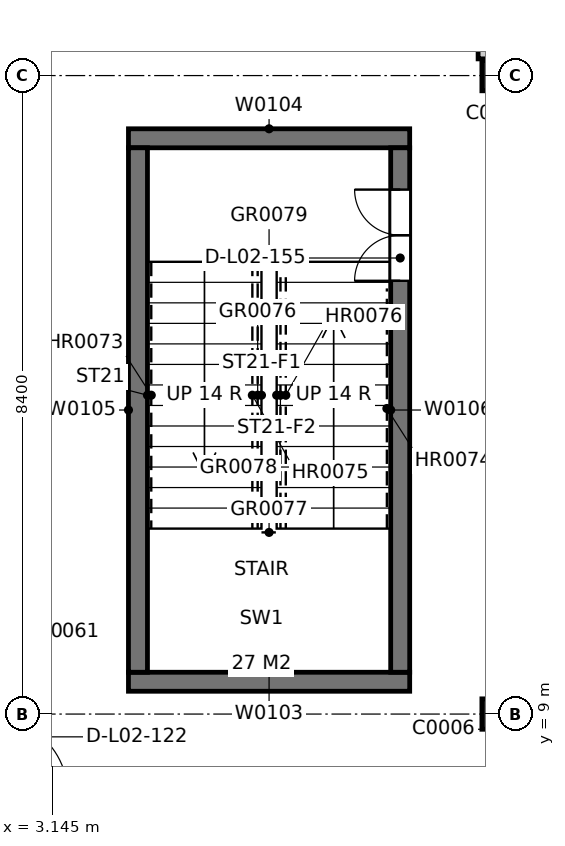
"""IFC4 building model, lengths in metres.
Left out: names, types, materials, properties, quantities, classifications, styles, units other than length and angle.
Written with IfcOpenShell. Run it as: python <this file> out.ifc"""

import sys

from ifc_helpers import new_model, si_unit, direction, frame, frame_2d, origin, origin_2d, place, context, subcontext, project, spatial, rectangle, extrude, element, fill, save


model = new_model("IFC4")
c1 = context("Model", 3, precision=1e-05, world=origin(), true_north=direction((0.0, 1.0)))
c2 = subcontext(c1, "Body", "Model", "MODEL_VIEW")
j1 = project(units=[si_unit("LENGTHUNIT", "METRE"), si_unit("PLANEANGLEUNIT", "RADIAN")], contexts=[c1])
p1 = place(None, origin())
s1 = spatial("IfcSite", under=j1, at=p1, CompositionType="ELEMENT")
p2 = place(p1, origin())
s2 = spatial("IfcBuilding", under=s1, at=p2, CompositionType="ELEMENT")
p3 = place(p2, frame((0.0, 0.0, 9.6)))
s3 = spatial("IfcBuildingStorey", under=s2, at=p3, CompositionType="ELEMENT", Elevation=9.6)
for number, where, z_axis, x_axis in (
    (1, (9.0, 9.0, 0.0), (0.0, 0.0, 1.0), (1.0, 0.0, 0.0)),
    (2, (9.0, 17.4, 0.0), (0.0, 0.0, 1.0), (1.0, 0.0, 0.0)),
):
    element("IfcColumn", number, at=place(p3, frame(where, z_axis=z_axis, x_axis=x_axis)), inside=s3, PredefinedType="COLUMN", context=c2, shape_type="SweptSolid", body=[
        extrude(rectangle(XDim=0.4, YDim=0.4, at=origin_2d()), origin(), (0.0, 0.0, 1.0), 4.8),
    ])
for number, where, z_axis, x_axis in (
    (3, (4.15, 9.425, 0.0), (0.0, 0.0, 1.0), (1.0, 0.0, 0.0)),
    (4, (4.15, 16.575, 0.0), (0.0, 0.0, 1.0), (1.0, 0.0, 0.0)),
):
    element("IfcWall", number, at=place(p3, frame(where, z_axis=z_axis, x_axis=x_axis)), inside=s3, PredefinedType="SOLIDWALL", context=c2, shape_type="SweptSolid", body=[
        extrude(rectangle(XDim=3.7, YDim=0.25, at=frame_2d((1.85, 0.0))), origin(), (0.0, 0.0, 1.0), 4.8),
    ])
p4 = place(p3, frame((4.275, 9.55, 0.0), z_axis=(0.0, 0.0, 1.0), x_axis=(0.0, 1.0, 0.0)))
e5 = element("IfcWall", 5, at=p4, inside=s3, PredefinedType="SOLIDWALL", context=c2, shape_type="SweptSolid", body=[
    extrude(rectangle(XDim=6.9, YDim=0.25, at=frame_2d((3.45, 0.0))), origin(), (0.0, 0.0, 1.0), 4.8),
])
p5 = place(p3, frame((7.725, 9.55, 0.0), z_axis=(0.0, 0.0, 1.0), x_axis=(0.0, 1.0, 0.0)))
e6 = element("IfcWall", 6, at=p5, inside=s3, PredefinedType="SOLIDWALL", context=c2, shape_type="SweptSolid", body=[
    extrude(rectangle(XDim=6.9, YDim=0.25, at=frame_2d((3.45, 0.0))), origin(), (0.0, 0.0, 1.0), 4.8),
])
p6 = place(p5, frame((5.15, 0.0, 0.0)))
e7 = element("IfcOpeningElement", 7, at=p6, cuts=e6, PredefinedType="OPENING", context=c2, shape_type="SweptSolid", body=[
    extrude(rectangle(XDim=1.2, YDim=2.1, at=frame_2d((0.6, 1.05))), frame((0.0, 0.135, 0.0), z_axis=(0.0, -1.0, 0.0), x_axis=(1.0, 0.0, 0.0)), (0.0, 0.0, 1.0), 0.27),
])
p7 = place(p3, frame((8.81, 18.562, 0.0), z_axis=(0.0, 0.0, 1.0), x_axis=(0.003370476059, -0.999994319929, 0.0)))
e8 = element("IfcWall", 8, at=p7, inside=s3, PredefinedType="PARTITIONING", context=c2, shape_type="SweptSolid", body=[
    extrude(rectangle(XDim=0.942, YDim=0.125, at=frame_2d((0.471, 0.0))), origin(), (0.0, 0.0, 1.0), 3.84),
])
p8 = place(p6, origin())
e9 = element("IfcDoor", 9, at=p8, inside=s3, OperationType="DOUBLE_DOOR_SINGLE_SWING", PredefinedType="DOOR", context=c2, shape_type="SweptSolid", body=[
    extrude(rectangle(XDim=1.2, YDim=2.1, at=frame_2d((0.6, 1.05))), frame((0.0, 0.025, 0.0), z_axis=(0.0, -1.0, 0.0), x_axis=(1.0, 0.0, 0.0)), (0.0, 0.0, 1.0), 0.05),
])
fill(e7, e9)
save(model, sys.argv[1])
